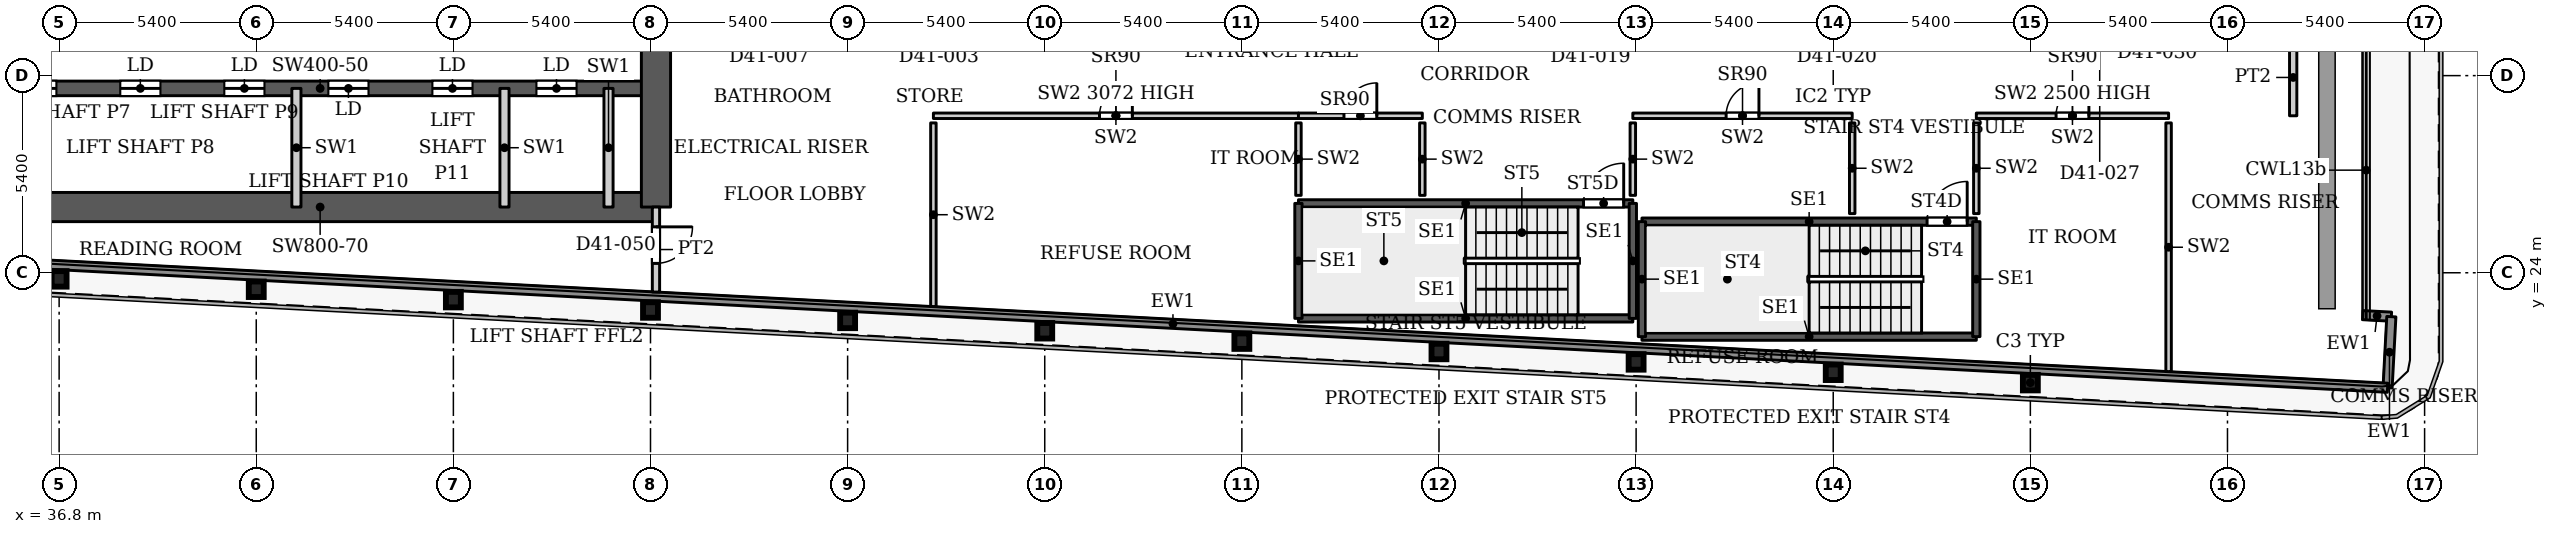
"""IFC4 building model, lengths in metres.
Left out: names, types, materials, properties, quantities, classifications, styles, units other than length and angle.
Written with IfcOpenShell. Run it as: python <this file> out.ifc"""

import sys

from ifc_helpers import new_model, si_unit, direction, frame, frame_2d, origin, origin_2d, place, context, subcontext, project, spatial, rectangle, i_section, extrude, source, transform, mapped, element, fill, save


model = new_model("IFC4")
c1 = context("Model", 3, precision=1e-05, world=origin(), true_north=direction((0.0, 1.0)))
c2 = subcontext(c1, "Body", "Model", "MODEL_VIEW")
j1 = project(units=[si_unit("LENGTHUNIT", "METRE"), si_unit("PLANEANGLEUNIT", "RADIAN")], contexts=[c1])
p1 = place(None, origin())
s1 = spatial("IfcSite", under=j1, at=p1, CompositionType="ELEMENT")
p2 = place(p1, origin())
s2 = spatial("IfcBuilding", under=s1, at=p2, CompositionType="ELEMENT")
p3 = place(p2, frame((0.0, 0.0, 179.9)))
s3 = spatial("IfcBuildingStorey", under=s2, at=p3, CompositionType="ELEMENT", Elevation=179.9)
for number, where, z_axis, x_axis in (
    (1, (90.8, 20.99, 0.0), (0.0, 0.0, 1.0), (1.0, 0.0, 0.0)),
    (2, (85.4, 21.274, 0.0), (0.0, 0.0, 1.0), (1.0, 0.0, 0.0)),
    (3, (80.0, 21.558, 0.0), (0.0, 0.0, 1.0), (1.0, 0.0, 0.0)),
    (4, (74.6, 21.843, 0.0), (0.0, 0.0, 1.0), (1.0, 0.0, 0.0)),
    (5, (69.2, 22.127, 0.0), (0.0, 0.0, 1.0), (1.0, 0.0, 0.0)),
    (6, (63.8, 22.411, 0.0), (0.0, 0.0, 1.0), (1.0, 0.0, 0.0)),
    (7, (58.4, 22.695, 0.0), (0.0, 0.0, 1.0), (1.0, 0.0, 0.0)),
    (8, (53.0, 22.98, 0.0), (0.0, 0.0, 1.0), (1.0, 0.0, 0.0)),
    (9, (47.6, 23.264, 0.0), (0.0, 0.0, 1.0), (1.0, 0.0, 0.0)),
    (10, (42.2, 23.548, 0.0), (0.0, 0.0, 1.0), (1.0, 0.0, 0.0)),
    (11, (36.8, 23.832, 0.0), (0.0, 0.0, 1.0), (1.0, 0.0, 0.0)),
):
    element("IfcColumn", number, at=place(p3, frame(where, z_axis=z_axis, x_axis=x_axis)), inside=s3, PredefinedType="COLUMN", context=c2, shape_type="SweptSolid", body=[
        extrude(i_section(OverallWidth=0.409, OverallDepth=0.425, WebThickness=0.033, FlangeThickness=0.052, FilletRadius=0.013, at=origin_2d()), origin(), (0.0, 0.0, 1.0), 3.9),
    ])
p4 = place(p3, frame((34.75, 25.8, 0.0), z_axis=(0.0, 0.0, 1.0), x_axis=(1.0, 0.0, 0.0)))
e12 = element("IfcWall", 12, at=p4, inside=s3, PredefinedType="SHEAR", context=c2, shape_type="SweptSolid", body=[
    extrude(rectangle(XDim=18.4, YDim=0.8, at=frame_2d((9.2, 0.0))), origin(), (0.0, 0.0, 1.0), 3.9),
])
p5 = place(p3, frame((34.75, 29.05, 0.0), z_axis=(0.0, 0.0, 1.0), x_axis=(1.0, 0.0, 0.0)))
e13 = element("IfcWall", 13, at=p5, inside=s3, PredefinedType="SHEAR", context=c2, shape_type="SweptSolid", body=[
    extrude(rectangle(XDim=18.4, YDim=0.4, at=frame_2d((9.2, 0.0))), origin(), (0.0, 0.0, 1.0), 3.9),
])
p6 = place(p5, frame((0.875, 0.0, 0.0)))
e14 = element("IfcOpeningElement", 14, at=p6, cuts=e13, PredefinedType="OPENING", context=c2, shape_type="SweptSolid", body=[
    extrude(rectangle(XDim=1.1, YDim=2.2, at=frame_2d((0.55, 1.1))), frame((0.0, 0.21, 0.0), z_axis=(0.0, -1.0, 0.0), x_axis=(1.0, 0.0, 0.0)), (0.0, 0.0, 1.0), 0.42),
])
p7 = place(p5, frame((3.725, 0.0, 0.0)))
e15 = element("IfcOpeningElement", 15, at=p7, cuts=e13, PredefinedType="OPENING", context=c2, shape_type="SweptSolid", body=[
    extrude(rectangle(XDim=1.1, YDim=2.2, at=frame_2d((0.55, 1.1))), frame((0.0, 0.21, 0.0), z_axis=(0.0, -1.0, 0.0), x_axis=(1.0, 0.0, 0.0)), (0.0, 0.0, 1.0), 0.42),
])
p8 = place(p5, frame((6.575, 0.0, 0.0)))
e16 = element("IfcOpeningElement", 16, at=p8, cuts=e13, PredefinedType="OPENING", context=c2, shape_type="SweptSolid", body=[
    extrude(rectangle(XDim=1.1, YDim=2.2, at=frame_2d((0.55, 1.1))), frame((0.0, 0.21, 0.0), z_axis=(0.0, -1.0, 0.0), x_axis=(1.0, 0.0, 0.0)), (0.0, 0.0, 1.0), 0.42),
])
p9 = place(p5, frame((9.425, 0.0, 0.0)))
e17 = element("IfcOpeningElement", 17, at=p9, cuts=e13, PredefinedType="OPENING", context=c2, shape_type="SweptSolid", body=[
    extrude(rectangle(XDim=1.1, YDim=2.2, at=frame_2d((0.55, 1.1))), frame((0.0, 0.21, 0.0), z_axis=(0.0, -1.0, 0.0), x_axis=(1.0, 0.0, 0.0)), (0.0, 0.0, 1.0), 0.42),
])
p10 = place(p5, frame((12.275, 0.0, 0.0)))
e18 = element("IfcOpeningElement", 18, at=p10, cuts=e13, PredefinedType="OPENING", context=c2, shape_type="SweptSolid", body=[
    extrude(rectangle(XDim=1.1, YDim=2.2, at=frame_2d((0.55, 1.1))), frame((0.0, 0.21, 0.0), z_axis=(0.0, -1.0, 0.0), x_axis=(1.0, 0.0, 0.0)), (0.0, 0.0, 1.0), 0.42),
])
p11 = place(p5, frame((15.125, 0.0, 0.0)))
e19 = element("IfcOpeningElement", 19, at=p11, cuts=e13, PredefinedType="OPENING", context=c2, shape_type="SweptSolid", body=[
    extrude(rectangle(XDim=1.1, YDim=2.2, at=frame_2d((0.55, 1.1))), frame((0.0, 0.21, 0.0), z_axis=(0.0, -1.0, 0.0), x_axis=(1.0, 0.0, 0.0)), (0.0, 0.0, 1.0), 0.42),
])
p12 = place(p3, frame((53.15, 25.8, 0.0), z_axis=(0.0, 0.0, 1.0), x_axis=(0.0, 1.0, 0.0)))
e20 = element("IfcWall", 20, at=p12, inside=s3, PredefinedType="SHEAR", context=c2, shape_type="SweptSolid", body=[
    extrude(rectangle(XDim=10.4, YDim=0.8, at=frame_2d((5.2, 0.0))), origin(), (0.0, 0.0, 1.0), 3.9),
])
p13 = place(p3, frame((99.907, 22.839, 0.0), z_axis=(0.0, 0.0, 1.0), x_axis=(0.998561284263, -0.053622398031, 0.0)))
e21 = element("IfcWall", 21, at=p13, inside=s3, PredefinedType="SOLIDWALL", context=c2, shape_type="SweptSolid", body=[
    extrude(rectangle(XDim=0.783, YDim=0.25, at=frame_2d((0.392, 0.0))), origin(), (0.0, 0.0, 1.0), 3.75),
])
p14 = place(p3, frame((100.689, 22.797, 0.0), z_axis=(0.0, 0.0, 1.0), x_axis=(-0.052841433274, -0.998602915542, 0.0)))
e22 = element("IfcWall", 22, at=p14, inside=s3, PredefinedType="SOLIDWALL", context=c2, shape_type="SweptSolid", body=[
    extrude(rectangle(XDim=1.95, YDim=0.25, at=frame_2d((0.975, 0.0))), origin(), (0.0, 0.0, 1.0), 3.75),
])
p15 = place(p3, frame((100.586, 20.85, 0.0), z_axis=(0.0, 0.0, 1.0), x_axis=(-0.99861746497, 0.052565755559, 0.0)))
e23 = element("IfcWall", 23, at=p15, inside=s3, PredefinedType="SOLIDWALL", context=c2, shape_type="SweptSolid", body=[
    extrude(rectangle(XDim=66.639, YDim=0.25, at=frame_2d((33.319, 0.0))), origin(), (0.0, 0.0, 1.0), 3.75),
])
p16 = place(p3, frame((80.16, 22.25, 0.0), z_axis=(0.0, 0.0, 1.0), x_axis=(1.0, 0.0, 0.0)))
e24 = element("IfcWall", 24, at=p16, inside=s3, PredefinedType="SHEAR", context=c2, shape_type="SweptSolid", body=[
    extrude(rectangle(XDim=9.16, YDim=0.2, at=frame_2d((4.58, 0.0))), origin(), (0.0, 0.0, 1.0), 3.9),
])
p17 = place(p3, frame((80.16, 25.4, 0.0), z_axis=(0.0, 0.0, 1.0), x_axis=(1.0, 0.0, 0.0)))
e25 = element("IfcWall", 25, at=p17, inside=s3, PredefinedType="SHEAR", context=c2, shape_type="SweptSolid", body=[
    extrude(rectangle(XDim=9.16, YDim=0.2, at=frame_2d((4.58, 0.0))), origin(), (0.0, 0.0, 1.0), 3.9),
])
p18 = place(p17, frame((7.81, 0.0, 0.0)))
e26 = element("IfcOpeningElement", 26, at=p18, cuts=e25, PredefinedType="OPENING", context=c2, shape_type="SweptSolid", body=[
    extrude(rectangle(XDim=1.1, YDim=2.2, at=frame_2d((0.55, 1.1))), frame((0.0, 0.11, 0.0), z_axis=(0.0, -1.0, 0.0), x_axis=(1.0, 0.0, 0.0)), (0.0, 0.0, 1.0), 0.22),
])
for number, where, z_axis, x_axis in (
    (27, (80.16, 22.25, 0.0), (0.0, 0.0, 1.0), (0.0, 1.0, 0.0)),
    (28, (89.32, 22.25, 0.0), (0.0, 0.0, 1.0), (0.0, 1.0, 0.0)),
):
    element("IfcWall", number, at=place(p3, frame(where, z_axis=z_axis, x_axis=x_axis)), inside=s3, PredefinedType="SHEAR", context=c2, shape_type="SweptSolid", body=[
        extrude(rectangle(XDim=3.15, YDim=0.2, at=frame_2d((1.575, 0.0))), origin(), (0.0, 0.0, 1.0), 3.9),
    ])
p19 = place(p3, frame((70.75, 22.75, 0.0), z_axis=(0.0, 0.0, 1.0), x_axis=(1.0, 0.0, 0.0)))
e29 = element("IfcWall", 29, at=p19, inside=s3, PredefinedType="SHEAR", context=c2, shape_type="SweptSolid", body=[
    extrude(rectangle(XDim=9.16, YDim=0.2, at=frame_2d((4.58, 0.0))), origin(), (0.0, 0.0, 1.0), 3.9),
])
p20 = place(p3, frame((70.75, 25.9, 0.0), z_axis=(0.0, 0.0, 1.0), x_axis=(1.0, 0.0, 0.0)))
e30 = element("IfcWall", 30, at=p20, inside=s3, PredefinedType="SHEAR", context=c2, shape_type="SweptSolid", body=[
    extrude(rectangle(XDim=9.16, YDim=0.2, at=frame_2d((4.58, 0.0))), origin(), (0.0, 0.0, 1.0), 3.9),
])
p21 = place(p20, frame((7.81, 0.0, 0.0)))
e31 = element("IfcOpeningElement", 31, at=p21, cuts=e30, PredefinedType="OPENING", context=c2, shape_type="SweptSolid", body=[
    extrude(rectangle(XDim=1.1, YDim=2.2, at=frame_2d((0.55, 1.1))), frame((0.0, 0.11, 0.0), z_axis=(0.0, -1.0, 0.0), x_axis=(1.0, 0.0, 0.0)), (0.0, 0.0, 1.0), 0.22),
])
for number, where, z_axis, x_axis in (
    (32, (70.75, 22.75, 0.0), (0.0, 0.0, 1.0), (0.0, 1.0, 0.0)),
    (33, (79.91, 22.75, 0.0), (0.0, 0.0, 1.0), (0.0, 1.0, 0.0)),
):
    element("IfcWall", number, at=place(p3, frame(where, z_axis=z_axis, x_axis=x_axis)), inside=s3, PredefinedType="SHEAR", context=c2, shape_type="SweptSolid", body=[
        extrude(rectangle(XDim=3.15, YDim=0.2, at=frame_2d((1.575, 0.0))), origin(), (0.0, 0.0, 1.0), 3.9),
    ])
for number, where, z_axis, x_axis in (
    (34, (43.3, 25.8, 0.0), (0.0, 0.0, 1.0), (0.0, 1.0, 0.0)),
    (35, (49.0, 25.8, 0.0), (0.0, 0.0, 1.0), (0.0, 1.0, 0.0)),
    (36, (51.85, 25.8, 0.0), (0.0, 0.0, 1.0), (0.0, 1.0, 0.0)),
):
    element("IfcWall", number, at=place(p3, frame(where, z_axis=z_axis, x_axis=x_axis)), inside=s3, PredefinedType="PARTITIONING", context=c2, shape_type="SweptSolid", body=[
        extrude(rectangle(XDim=3.25, YDim=0.25, at=frame_2d((1.625, 0.0))), origin(), (0.0, 0.0, 1.0), 3.9),
    ])
p22 = place(p3, frame((60.75, 28.3, 0.0), z_axis=(0.0, 0.0, 1.0), x_axis=(1.0, 0.0, 0.0)))
e37 = element("IfcWall", 37, at=p22, inside=s3, PredefinedType="PARTITIONING", context=c2, shape_type="SweptSolid", body=[
    extrude(rectangle(XDim=10.0, YDim=0.15, at=frame_2d((5.0, 0.0))), origin(), (0.0, 0.0, 1.0), 3.072),
])
p23 = place(p22, frame((4.55, 0.0, 0.0)))
e38 = element("IfcOpeningElement", 38, at=p23, cuts=e37, PredefinedType="OPENING", context=c2, shape_type="SweptSolid", body=[
    extrude(rectangle(XDim=0.9, YDim=2.2, at=frame_2d((0.45, 1.1))), frame((0.0, 0.085, 0.0), z_axis=(0.0, -1.0, 0.0), x_axis=(1.0, 0.0, 0.0)), (0.0, 0.0, 1.0), 0.17),
])
p24 = place(p3, frame((60.75, 23.075, 0.0), z_axis=(0.0, 0.0, 1.0), x_axis=(0.0, 1.0, 0.0)))
e39 = element("IfcWall", 39, at=p24, inside=s3, PredefinedType="PARTITIONING", context=c2, shape_type="SweptSolid", body=[
    extrude(rectangle(XDim=5.03, YDim=0.15, at=frame_2d((2.515, 0.0))), origin(), (0.0, 0.0, 1.0), 3.9),
])
p25 = place(p3, frame((70.75, 26.12, 0.0), z_axis=(0.0, 0.0, 1.0), x_axis=(0.0, 1.0, 0.0)))
e40 = element("IfcWall", 40, at=p25, inside=s3, PredefinedType="PARTITIONING", context=c2, shape_type="SweptSolid", body=[
    extrude(rectangle(XDim=1.985, YDim=0.15, at=frame_2d((0.992, 0.0))), origin(), (0.0, 0.0, 1.0), 3.9),
])
p26 = place(p3, frame((70.75, 28.3, 0.0), z_axis=(0.0, 0.0, 1.0), x_axis=(1.0, 0.0, 0.0)))
e41 = element("IfcWall", 41, at=p26, inside=s3, PredefinedType="PARTITIONING", context=c2, shape_type="SweptSolid", body=[
    extrude(rectangle(XDim=3.394, YDim=0.15, at=frame_2d((1.697, 0.0))), origin(), (0.0, 0.0, 1.0), 3.9),
])
p27 = place(p26, frame((1.247, 0.0, 0.0)))
e42 = element("IfcOpeningElement", 42, at=p27, cuts=e41, PredefinedType="OPENING", context=c2, shape_type="SweptSolid", body=[
    extrude(rectangle(XDim=0.9, YDim=2.2, at=frame_2d((0.45, 1.1))), frame((0.0, 0.085, 0.0), z_axis=(0.0, -1.0, 0.0), x_axis=(1.0, 0.0, 0.0)), (0.0, 0.0, 1.0), 0.17),
])
p28 = place(p3, frame((74.144, 26.12, 0.0), z_axis=(0.0, 0.0, 1.0), x_axis=(0.0, 1.0, 0.0)))
e43 = element("IfcWall", 43, at=p28, inside=s3, PredefinedType="PARTITIONING", context=c2, shape_type="SweptSolid", body=[
    extrude(rectangle(XDim=1.985, YDim=0.15, at=frame_2d((0.992, 0.0))), origin(), (0.0, 0.0, 1.0), 3.9),
])
p29 = place(p3, frame((79.91, 28.3, 0.0), z_axis=(0.0, 0.0, 1.0), x_axis=(1.0, 0.0, 0.0)))
e44 = element("IfcWall", 44, at=p29, inside=s3, PredefinedType="PARTITIONING", context=c2, shape_type="SweptSolid", body=[
    extrude(rectangle(XDim=6.01, YDim=0.15, at=frame_2d((3.005, 0.0))), origin(), (0.0, 0.0, 1.0), 3.9),
])
p30 = place(p29, frame((2.555, 0.0, 0.0)))
e45 = element("IfcOpeningElement", 45, at=p30, cuts=e44, PredefinedType="OPENING", context=c2, shape_type="SweptSolid", body=[
    extrude(rectangle(XDim=0.9, YDim=2.2, at=frame_2d((0.45, 1.1))), frame((0.0, 0.085, 0.0), z_axis=(0.0, -1.0, 0.0), x_axis=(1.0, 0.0, 0.0)), (0.0, 0.0, 1.0), 0.17),
])
p31 = place(p3, frame((79.91, 26.12, 0.0), z_axis=(0.0, 0.0, 1.0), x_axis=(0.0, 1.0, 0.0)))
e46 = element("IfcWall", 46, at=p31, inside=s3, PredefinedType="PARTITIONING", context=c2, shape_type="SweptSolid", body=[
    extrude(rectangle(XDim=1.985, YDim=0.15, at=frame_2d((0.992, 0.0))), origin(), (0.0, 0.0, 1.0), 3.9),
])
p32 = place(p3, frame((85.92, 25.62, 0.0), z_axis=(0.0, 0.0, 1.0), x_axis=(0.0, 1.0, 0.0)))
e47 = element("IfcWall", 47, at=p32, inside=s3, PredefinedType="PARTITIONING", context=c2, shape_type="SweptSolid", body=[
    extrude(rectangle(XDim=2.485, YDim=0.15, at=frame_2d((1.242, 0.0))), origin(), (0.0, 0.0, 1.0), 3.9),
])
p33 = place(p3, frame((89.32, 28.3, 0.0), z_axis=(0.0, 0.0, 1.0), x_axis=(1.0, 0.0, 0.0)))
e48 = element("IfcWall", 48, at=p33, inside=s3, PredefinedType="PARTITIONING", context=c2, shape_type="SweptSolid", body=[
    extrude(rectangle(XDim=5.267, YDim=0.15, at=frame_2d((2.633, 0.0))), origin(), (0.0, 0.0, 1.0), 2.5),
])
p34 = place(p33, frame((2.184, 0.0, 0.0)))
e49 = element("IfcOpeningElement", 49, at=p34, cuts=e48, PredefinedType="OPENING", context=c2, shape_type="SweptSolid", body=[
    extrude(rectangle(XDim=0.9, YDim=2.2, at=frame_2d((0.45, 1.1))), frame((0.0, 0.085, 0.0), z_axis=(0.0, -1.0, 0.0), x_axis=(1.0, 0.0, 0.0)), (0.0, 0.0, 1.0), 0.17),
])
p35 = place(p3, frame((89.32, 25.62, 0.0), z_axis=(0.0, 0.0, 1.0), x_axis=(0.0, 1.0, 0.0)))
e50 = element("IfcWall", 50, at=p35, inside=s3, PredefinedType="PARTITIONING", context=c2, shape_type="SweptSolid", body=[
    extrude(rectangle(XDim=2.485, YDim=0.15, at=frame_2d((1.242, 0.0))), origin(), (0.0, 0.0, 1.0), 3.9),
])
p36 = place(p3, frame((94.587, 21.293, 0.0), z_axis=(0.0, 0.0, 1.0), x_axis=(0.0, 1.0, 0.0)))
e51 = element("IfcWall", 51, at=p36, inside=s3, PredefinedType="PARTITIONING", context=c2, shape_type="SweptSolid", body=[
    extrude(rectangle(XDim=6.812, YDim=0.15, at=frame_2d((3.406, 0.0))), origin(), (0.0, 0.0, 1.0), 3.9),
])
p37 = place(p3, frame((53.15, 23.472, 0.0), z_axis=(0.0, 0.0, 1.0), x_axis=(0.0, 1.0, 0.0)))
e52 = element("IfcWall", 52, at=p37, inside=s3, PredefinedType="PARTITIONING", context=c2, shape_type="SweptSolid", body=[
    extrude(rectangle(XDim=2.328, YDim=0.2, at=frame_2d((1.164, 0.0))), origin(), (0.0, 0.0, 1.0), 3.6),
])
p38 = place(p37, frame((0.785, 0.0, 0.0)))
e53 = element("IfcOpeningElement", 53, at=p38, cuts=e52, PredefinedType="OPENING", context=c2, shape_type="SweptSolid", body=[
    extrude(rectangle(XDim=1.0, YDim=2.1, at=frame_2d((0.5, 1.05))), frame((0.0, 0.11, 0.0), z_axis=(0.0, -1.0, 0.0), x_axis=(1.0, 0.0, 0.0)), (0.0, 0.0, 1.0), 0.22),
])
p39 = place(p3, frame((98.0, 28.3, 0.0), z_axis=(0.0, 0.0, 1.0), x_axis=(0.0, 1.0, 0.0)))
e54 = element("IfcWall", 54, at=p39, inside=s3, PredefinedType="PARTITIONING", context=c2, shape_type="SweptSolid", body=[
    extrude(rectangle(XDim=2.1, YDim=0.2, at=frame_2d((1.05, 0.0))), origin(), (0.0, 0.0, 1.0), 3.6),
])
m1 = source(origin(), c2, "Body", "SweptSolid", [
    extrude(rectangle(XDim=1.1, YDim=2.2, at=frame_2d((0.55, 1.1))), frame((0.0, 0.025, 0.0), z_axis=(0.0, -1.0, 0.0), x_axis=(1.0, 0.0, 0.0)), (0.0, 0.0, 1.0), 0.05),
])
p40 = place(p6, origin())
e55 = element("IfcDoor", 55, at=p40, inside=s3, OperationType="SLIDING_TO_LEFT", PredefinedType="DOOR", context=c2, shape_type="MappedRepresentation", body=[
    mapped(m1, transform((0.0, 0.0, 0.0), x_axis=(1.0, 0.0, 0.0), y_axis=(0.0, 1.0, 0.0), z_axis=(0.0, 0.0, 1.0), scale=1.0)),
])
fill(e14, e55)
p41 = place(p7, origin())
e56 = element("IfcDoor", 56, at=p41, inside=s3, OperationType="SLIDING_TO_LEFT", PredefinedType="DOOR", context=c2, shape_type="MappedRepresentation", body=[
    mapped(m1, transform((0.0, 0.0, 0.0), x_axis=(1.0, 0.0, 0.0), y_axis=(0.0, 1.0, 0.0), z_axis=(0.0, 0.0, 1.0), scale=1.0)),
])
fill(e15, e56)
p42 = place(p8, origin())
e57 = element("IfcDoor", 57, at=p42, inside=s3, OperationType="SLIDING_TO_LEFT", PredefinedType="DOOR", context=c2, shape_type="MappedRepresentation", body=[
    mapped(m1, transform((0.0, 0.0, 0.0), x_axis=(1.0, 0.0, 0.0), y_axis=(0.0, 1.0, 0.0), z_axis=(0.0, 0.0, 1.0), scale=1.0)),
])
fill(e16, e57)
p43 = place(p9, origin())
e58 = element("IfcDoor", 58, at=p43, inside=s3, OperationType="SLIDING_TO_LEFT", PredefinedType="DOOR", context=c2, shape_type="MappedRepresentation", body=[
    mapped(m1, transform((0.0, 0.0, 0.0), x_axis=(1.0, 0.0, 0.0), y_axis=(0.0, 1.0, 0.0), z_axis=(0.0, 0.0, 1.0), scale=1.0)),
])
fill(e17, e58)
p44 = place(p10, origin())
e59 = element("IfcDoor", 59, at=p44, inside=s3, OperationType="SLIDING_TO_LEFT", PredefinedType="DOOR", context=c2, shape_type="MappedRepresentation", body=[
    mapped(m1, transform((0.0, 0.0, 0.0), x_axis=(1.0, 0.0, 0.0), y_axis=(0.0, 1.0, 0.0), z_axis=(0.0, 0.0, 1.0), scale=1.0)),
])
fill(e18, e59)
p45 = place(p11, origin())
e60 = element("IfcDoor", 60, at=p45, inside=s3, OperationType="SLIDING_TO_LEFT", PredefinedType="DOOR", context=c2, shape_type="MappedRepresentation", body=[
    mapped(m1, transform((0.0, 0.0, 0.0), x_axis=(1.0, 0.0, 0.0), y_axis=(0.0, 1.0, 0.0), z_axis=(0.0, 0.0, 1.0), scale=1.0)),
])
fill(e19, e60)
m2 = source(origin(), c2, "Body", "SweptSolid", [
    extrude(rectangle(XDim=0.9, YDim=2.2, at=frame_2d((0.45, 1.1))), frame((0.0, 0.025, 0.0), z_axis=(0.0, -1.0, 0.0), x_axis=(1.0, 0.0, 0.0)), (0.0, 0.0, 1.0), 0.05),
])
p46 = place(p23, origin())
e61 = element("IfcDoor", 61, at=p46, inside=s3, OperationType="SINGLE_SWING_LEFT", PredefinedType="DOOR", context=c2, shape_type="MappedRepresentation", body=[
    mapped(m2, transform((0.0, 0.0, 0.0), x_axis=(1.0, 0.0, 0.0), y_axis=(0.0, 1.0, 0.0), z_axis=(0.0, 0.0, 1.0), scale=1.0)),
])
fill(e38, e61)
p47 = place(p27, origin())
e62 = element("IfcDoor", 62, at=p47, inside=s3, OperationType="SINGLE_SWING_LEFT", PredefinedType="DOOR", context=c2, shape_type="MappedRepresentation", body=[
    mapped(m2, transform((0.0, 0.0, 0.0), x_axis=(1.0, 0.0, 0.0), y_axis=(0.0, 1.0, 0.0), z_axis=(0.0, 0.0, 1.0), scale=1.0)),
])
fill(e42, e62)
p48 = place(p30, origin())
e63 = element("IfcDoor", 63, at=p48, inside=s3, OperationType="SINGLE_SWING_LEFT", PredefinedType="DOOR", context=c2, shape_type="MappedRepresentation", body=[
    mapped(m2, transform((0.0, 0.0, 0.0), x_axis=(1.0, 0.0, 0.0), y_axis=(0.0, 1.0, 0.0), z_axis=(0.0, 0.0, 1.0), scale=1.0)),
])
fill(e45, e63)
p49 = place(p34, origin())
e64 = element("IfcDoor", 64, at=p49, inside=s3, OperationType="SINGLE_SWING_LEFT", PredefinedType="DOOR", context=c2, shape_type="MappedRepresentation", body=[
    mapped(m2, transform((0.0, 0.0, 0.0), x_axis=(1.0, 0.0, 0.0), y_axis=(0.0, 1.0, 0.0), z_axis=(0.0, 0.0, 1.0), scale=1.0)),
])
fill(e49, e64)
m3 = source(origin(), c2, "Body", "SweptSolid", [
    extrude(rectangle(XDim=1.1, YDim=2.2, at=frame_2d((0.55, 1.1))), frame((0.0, 0.025, 0.0), z_axis=(0.0, -1.0, 0.0), x_axis=(1.0, 0.0, 0.0)), (0.0, 0.0, 1.0), 0.05),
])
p50 = place(p18, origin())
e65 = element("IfcDoor", 65, at=p50, inside=s3, OperationType="SINGLE_SWING_LEFT", PredefinedType="DOOR", context=c2, shape_type="MappedRepresentation", body=[
    mapped(m3, transform((0.0, 0.0, 0.0), x_axis=(1.0, 0.0, 0.0), y_axis=(0.0, 1.0, 0.0), z_axis=(0.0, 0.0, 1.0), scale=1.0)),
])
fill(e26, e65)
p51 = place(p21, origin())
e66 = element("IfcDoor", 66, at=p51, inside=s3, OperationType="SINGLE_SWING_LEFT", PredefinedType="DOOR", context=c2, shape_type="MappedRepresentation", body=[
    mapped(m3, transform((0.0, 0.0, 0.0), x_axis=(1.0, 0.0, 0.0), y_axis=(0.0, 1.0, 0.0), z_axis=(0.0, 0.0, 1.0), scale=1.0)),
])
fill(e31, e66)
m4 = source(origin(), c2, "Body", "SweptSolid", [
    extrude(rectangle(XDim=1.0, YDim=2.1, at=frame_2d((0.5, 1.05))), frame((0.0, 0.025, 0.0), z_axis=(0.0, -1.0, 0.0), x_axis=(1.0, 0.0, 0.0)), (0.0, 0.0, 1.0), 0.05),
])
p52 = place(p38, origin())
e67 = element("IfcDoor", 67, at=p52, inside=s3, OperationType="SINGLE_SWING_RIGHT", PredefinedType="DOOR", context=c2, shape_type="MappedRepresentation", body=[
    mapped(m4, transform((0.0, 0.0, 0.0), x_axis=(1.0, 0.0, 0.0), y_axis=(0.0, 1.0, 0.0), z_axis=(0.0, 0.0, 1.0), scale=1.0)),
])
fill(e53, e67)
save(model, sys.argv[1])
